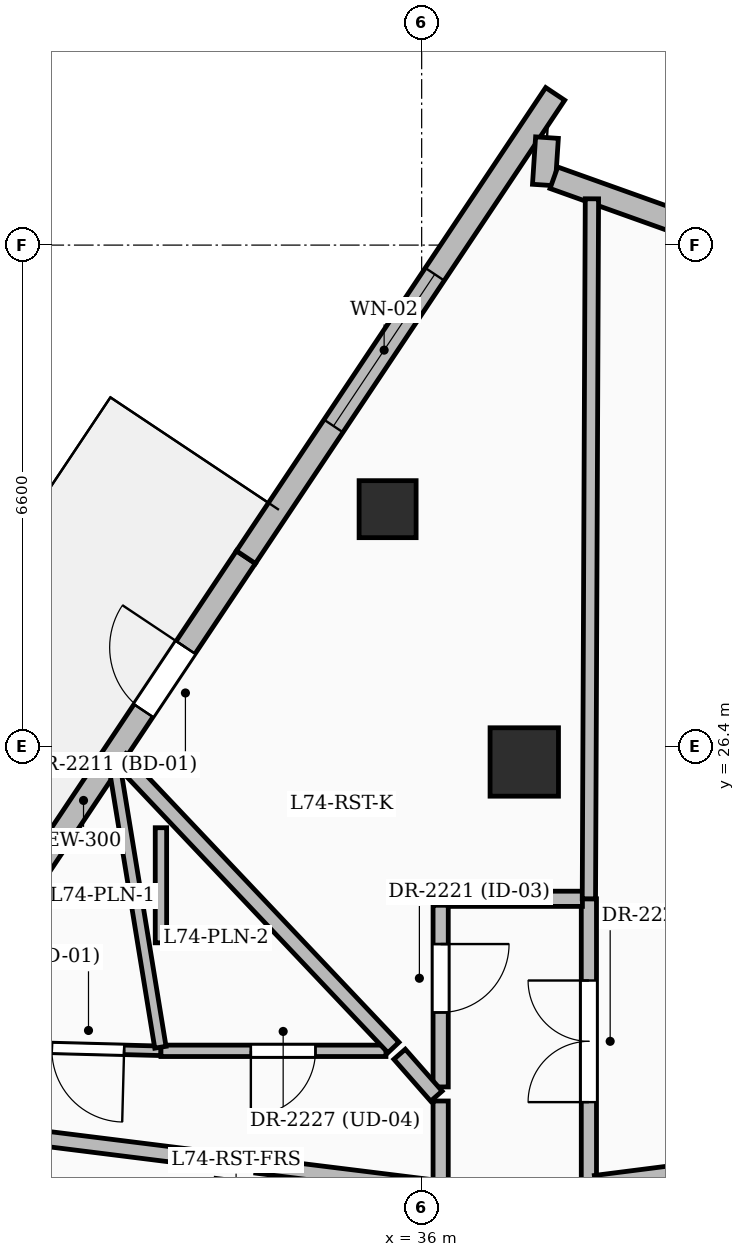
"""IFC4 building model, lengths in metres.
Left out: names, types, materials, properties, quantities, classifications, styles, units other than length and angle.
Written with IfcOpenShell. Run it as: python <this file> out.ifc"""

import sys

from ifc_helpers import new_model, si_unit, direction, frame, frame_2d, origin, origin_2d, place, context, subcontext, project, spatial, rectangle, extrude, element, fill, save


model = new_model("IFC4")
c1 = context("Model", 3, precision=1e-05, world=origin(), true_north=direction((0.0, 1.0)))
c2 = subcontext(c1, "Body", "Model", "MODEL_VIEW")
j1 = project(units=[si_unit("LENGTHUNIT", "METRE"), si_unit("PLANEANGLEUNIT", "RADIAN")], contexts=[c1])
p1 = place(None, origin())
s1 = spatial("IfcSite", under=j1, at=p1, CompositionType="ELEMENT")
p2 = place(p1, origin())
s2 = spatial("IfcBuilding", under=s1, at=p2, CompositionType="ELEMENT")
p3 = place(p2, frame((0.0, 0.0, 285.75)))
s3 = spatial("IfcBuildingStorey", under=s2, at=p3, CompositionType="ELEMENT", Elevation=285.75)
p4 = place(p3, frame((37.35, 26.2, 0.0), z_axis=(0.0, 0.0, 1.0), x_axis=(1.0, 0.0, 0.0)))
e1 = element("IfcColumn", 1, at=p4, inside=s3, PredefinedType="COLUMN", context=c2, shape_type="SweptSolid", body=[
    extrude(rectangle(XDim=0.9, YDim=0.9, at=origin_2d()), origin(), (0.0, 0.0, 1.0), 3.75),
])
p5 = place(p3, frame((35.552, 29.526, 0.0), z_axis=(0.0, 0.0, 1.0), x_axis=(1.0, 0.0, 0.0)))
e2 = element("IfcColumn", 2, at=p5, inside=s3, PredefinedType="COLUMN", context=c2, shape_type="SweptSolid", body=[
    extrude(rectangle(XDim=0.75, YDim=0.75, at=origin_2d()), origin(), (0.0, 0.0, 1.0), 3.75),
])
p6 = place(p3, frame((29.415, 22.493, 0.0), z_axis=(0.0, 0.0, 1.0), x_axis=(0.5552198311, 0.831703636612, 0.0)))
e3 = element("IfcWall", 3, at=p6, inside=s3, PredefinedType="SOLIDWALL", context=c2, shape_type="SweptSolid", body=[
    extrude(rectangle(XDim=7.696, YDim=0.3, at=frame_2d((3.848, 0.0))), origin(), (0.0, 0.0, 1.0), 3.45),
])
p7 = place(p6, frame((5.269, 0.0, 0.0)))
e4 = element("IfcOpeningElement", 4, at=p7, cuts=e3, PredefinedType="OPENING", context=c2, shape_type="SweptSolid", body=[
    extrude(rectangle(XDim=1.0, YDim=2.2, at=frame_2d((0.5, 1.1))), frame((0.0, 0.16, 0.0), z_axis=(0.0, -1.0, 0.0), x_axis=(1.0, 0.0, 0.0)), (0.0, 0.0, 1.0), 0.32),
])
p8 = place(p3, frame((33.688, 28.895, 0.0), z_axis=(0.0, 0.0, 1.0), x_axis=(0.555199825996, 0.831716991058, 0.0)))
e5 = element("IfcWall", 5, at=p8, inside=s3, PredefinedType="SOLIDWALL", context=c2, shape_type="SweptSolid", body=[
    extrude(rectangle(XDim=7.328, YDim=0.3, at=frame_2d((3.664, 0.0))), origin(), (0.0, 0.0, 1.0), 3.45),
])
p9 = place(p8, frame((2.075, 0.0, 0.6)))
e6 = element("IfcOpeningElement", 6, at=p9, cuts=e5, PredefinedType="OPENING", context=c2, shape_type="SweptSolid", body=[
    extrude(rectangle(XDim=2.4, YDim=2.1, at=frame_2d((1.2, 1.05))), frame((0.0, 0.16, 0.0), z_axis=(0.0, -1.0, 0.0), x_axis=(1.0, 0.0, 0.0)), (0.0, 0.0, 1.0), 0.32),
])
p10 = place(p3, frame((37.649, 34.414, 0.0), z_axis=(0.0, 0.0, 1.0), x_axis=(-0.065222861299, -0.99787072227, 0.0)))
e7 = element("IfcWall", 7, at=p10, inside=s3, PredefinedType="SOLIDWALL", context=c2, shape_type="SweptSolid", body=[
    extrude(rectangle(XDim=0.625, YDim=0.3, at=frame_2d((0.312, 0.0))), origin(), (0.0, 0.0, 1.0), 3.45),
])
p11 = place(p3, frame((37.74, 33.886, 0.0), z_axis=(0.0, 0.0, 1.0), x_axis=(0.941667785429, -0.336543878097, 0.0)))
e8 = element("IfcWall", 8, at=p11, inside=s3, PredefinedType="SOLIDWALL", context=c2, shape_type="SweptSolid", body=[
    extrude(rectangle(XDim=2.087, YDim=0.3, at=frame_2d((1.043, 0.0))), origin(), (0.0, 0.0, 1.0), 3.45),
])
p12 = place(p3, frame((36.25, 21.74, 0.0), z_axis=(0.0, 0.0, 1.0), x_axis=(0.0, -1.0, 0.0)))
e9 = element("IfcWall", 9, at=p12, inside=s3, PredefinedType="PARTITIONING", context=c2, shape_type="SweptSolid", body=[
    extrude(rectangle(XDim=1.15, YDim=0.2, at=frame_2d((0.575, 0.0))), origin(), (0.0, 0.0, 1.0), 3.45),
])
p13 = place(p3, frame((38.2, 20.65, 0.0), z_axis=(0.0, 0.0, 1.0), x_axis=(0.0, 1.0, 0.0)))
e10 = element("IfcWall", 10, at=p13, inside=s3, PredefinedType="PARTITIONING", context=c2, shape_type="SweptSolid", body=[
    extrude(rectangle(XDim=3.75, YDim=0.2, at=frame_2d((1.875, 0.0))), origin(), (0.0, 0.0, 1.0), 3.45),
])
p14 = place(p13, frame((1.075, 0.0, 0.0)))
e11 = element("IfcOpeningElement", 11, at=p14, cuts=e10, PredefinedType="OPENING", context=c2, shape_type="SweptSolid", body=[
    extrude(rectangle(XDim=1.6, YDim=2.3, at=frame_2d((0.8, 1.15))), frame((0.0, 0.11, 0.0), z_axis=(0.0, -1.0, 0.0), x_axis=(1.0, 0.0, 0.0)), (0.0, 0.0, 1.0), 0.22),
])
p15 = place(p3, frame((38.115, 24.4, 0.0), z_axis=(0.0, 0.0, 1.0), x_axis=(-1.0, 0.0, 0.0)))
e12 = element("IfcWall", 12, at=p15, inside=s3, PredefinedType="PARTITIONING", context=c2, shape_type="SweptSolid", body=[
    extrude(rectangle(XDim=1.865, YDim=0.2, at=frame_2d((0.933, 0.0))), origin(), (0.0, 0.0, 1.0), 2.635),
])
p16 = place(p3, frame((36.25, 24.315, 0.0), z_axis=(0.0, 0.0, 1.0), x_axis=(0.0, -1.0, 0.0)))
e13 = element("IfcWall", 13, at=p16, inside=s3, PredefinedType="PARTITIONING", context=c2, shape_type="SweptSolid", body=[
    extrude(rectangle(XDim=2.39, YDim=0.2, at=frame_2d((1.195, 0.0))), origin(), (0.0, 0.0, 1.0), 2.635),
])
p17 = place(p16, frame((0.51, 0.0, 0.0)))
e14 = element("IfcOpeningElement", 14, at=p17, cuts=e13, PredefinedType="OPENING", context=c2, shape_type="SweptSolid", body=[
    extrude(rectangle(XDim=0.9, YDim=2.1, at=frame_2d((0.45, 1.05))), frame((0.0, 0.11, 0.0), z_axis=(0.0, -1.0, 0.0), x_axis=(1.0, 0.0, 0.0)), (0.0, 0.0, 1.0), 0.22),
])
p18 = place(p3, frame((33.4, 20.95, 0.0), z_axis=(0.0, 0.0, 1.0), x_axis=(-0.992279994178, 0.124017793696, 0.0)))
e15 = element("IfcWall", 15, at=p18, inside=s3, PredefinedType="PARTITIONING", context=c2, shape_type="SweptSolid", body=[
    extrude(rectangle(XDim=3.547, YDim=0.2, at=frame_2d((1.774, 0.0))), origin(), (0.0, 0.0, 1.0), 2.641),
])
p19 = place(p3, frame((36.166, 20.601, 0.0), z_axis=(0.0, 0.0, 1.0), x_axis=(-0.992414530334, 0.122936568936, 0.0)))
e16 = element("IfcWall", 16, at=p19, inside=s3, PredefinedType="PARTITIONING", context=c2, shape_type="SweptSolid", body=[
    extrude(rectangle(XDim=2.353, YDim=0.2, at=frame_2d((1.177, 0.0))), origin(), (0.0, 0.0, 1.0), 2.635),
])
p20 = place(p3, frame((41.75, 21.102, 0.0), z_axis=(0.0, 0.0, 1.0), x_axis=(-0.991980560466, -0.126390536264, 0.0)))
e17 = element("IfcWall", 17, at=p20, inside=s3, PredefinedType="PARTITIONING", context=c2, shape_type="SweptSolid", body=[
    extrude(rectangle(XDim=3.494, YDim=0.2, at=frame_2d((1.747, 0.0))), origin(), (0.0, 0.0, 1.0), 3.45),
])
p21 = place(p3, frame((32.57, 22.4, 0.0), z_axis=(0.0, 0.0, 1.0), x_axis=(-0.999650958783, 0.02641894404, 0.0)))
e18 = element("IfcWall", 18, at=p21, inside=s3, PredefinedType="PARTITIONING", context=c2, shape_type="SweptSolid", body=[
    extrude(rectangle(XDim=3.031, YDim=0.125, at=frame_2d((1.516, 0.0))), origin(), (0.0, 0.0, 1.0), 3.45),
])
p22 = place(p21, frame((0.485, 0.0, 0.0)))
e19 = element("IfcOpeningElement", 19, at=p22, cuts=e18, PredefinedType="OPENING", context=c2, shape_type="SweptSolid", body=[
    extrude(rectangle(XDim=0.95, YDim=2.2, at=frame_2d((0.475, 1.1))), frame((0.0, 0.072, 0.0), z_axis=(0.0, -1.0, 0.0), x_axis=(1.0, 0.0, 0.0)), (0.0, 0.0, 1.0), 0.145),
])
p23 = place(p3, frame((35.53, 22.4, 0.0), z_axis=(0.0, 0.0, 1.0), x_axis=(-1.0, 0.0, 0.0)))
e20 = element("IfcWall", 20, at=p23, inside=s3, PredefinedType="PARTITIONING", context=c2, shape_type="SweptSolid", body=[
    extrude(rectangle(XDim=2.96, YDim=0.15, at=frame_2d((1.48, 0.0))), origin(), (0.0, 0.0, 1.0), 2.635),
])
p24 = place(p23, frame((0.927, 0.0, 0.0)))
e21 = element("IfcOpeningElement", 21, at=p24, cuts=e20, PredefinedType="OPENING", context=c2, shape_type="SweptSolid", body=[
    extrude(rectangle(XDim=0.85, YDim=2.1, at=frame_2d((0.425, 1.05))), frame((0.0, 0.085, 0.0), z_axis=(0.0, -1.0, 0.0), x_axis=(1.0, 0.0, 0.0)), (0.0, 0.0, 1.0), 0.17),
])
p25 = place(p3, frame((36.194, 21.804, 0.0), z_axis=(0.0, 0.0, 1.0), x_axis=(-0.659869913994, 0.751379861724, 0.0)))
e22 = element("IfcWall", 22, at=p25, inside=s3, PredefinedType="PARTITIONING", context=c2, shape_type="SweptSolid", body=[
    extrude(rectangle(XDim=0.734, YDim=0.2, at=frame_2d((0.367, 0.0))), origin(), (0.0, 0.0, 1.0), 3.45),
])
p26 = place(p3, frame((32.563, 22.447, 0.0), z_axis=(0.0, 0.0, 1.0), x_axis=(-0.161074254275, 0.986942290415, 0.0)))
e23 = element("IfcWall", 23, at=p26, inside=s3, PredefinedType="PARTITIONING", context=c2, shape_type="SweptSolid", body=[
    extrude(rectangle(XDim=3.704, YDim=0.15, at=frame_2d((1.852, 0.0))), origin(), (0.0, 0.0, 1.0), 2.641),
])
p27 = place(p3, frame((35.629, 22.444, 0.0), z_axis=(0.0, 0.0, 1.0), x_axis=(-0.687396257766, 0.726282579173, 0.0)))
e24 = element("IfcWall", 24, at=p27, inside=s3, PredefinedType="PARTITIONING", context=c2, shape_type="SweptSolid", body=[
    extrude(rectangle(XDim=5.23, YDim=0.2, at=frame_2d((2.615, 0.0))), origin(), (0.0, 0.0, 1.0), 2.635),
])
p28 = place(p3, frame((38.24, 33.609, 0.0), z_axis=(0.0, 0.0, 1.0), x_axis=(-0.004347784993, -0.999990548338, 0.0)))
e25 = element("IfcWall", 25, at=p28, inside=s3, PredefinedType="PARTITIONING", context=c2, shape_type="SweptSolid", body=[
    extrude(rectangle(XDim=9.209, YDim=0.175, at=frame_2d((4.604, 0.0))), origin(), (0.0, 0.0, 1.0), 2.47),
])
p29 = place(p3, frame((32.57, 25.335, 0.0), z_axis=(0.0, 0.0, 1.0), x_axis=(0.0, -1.0, 0.0)))
e26 = element("IfcWall", 26, at=p29, inside=s3, PredefinedType="PARTITIONING", context=c2, shape_type="SweptSolid", body=[
    extrude(rectangle(XDim=1.514, YDim=0.15, at=frame_2d((0.757, 0.0))), origin(), (0.0, 0.0, 1.0), 2.641),
])
p30 = place(p7, origin())
e27 = element("IfcDoor", 27, at=p30, inside=s3, OperationType="SINGLE_SWING_RIGHT", PredefinedType="DOOR", context=c2, shape_type="SweptSolid", body=[
    extrude(rectangle(XDim=1.0, YDim=2.2, at=frame_2d((0.5, 1.1))), frame((0.0, 0.025, 0.0), z_axis=(0.0, -1.0, 0.0), x_axis=(1.0, 0.0, 0.0)), (0.0, 0.0, 1.0), 0.05),
])
fill(e4, e27)
p31 = place(p9, origin())
e28 = element("IfcWindow", 28, at=p31, inside=s3, PartitioningType="SINGLE_PANEL", PredefinedType="WINDOW", context=c2, shape_type="SweptSolid", body=[
    extrude(rectangle(XDim=2.4, YDim=2.1, at=frame_2d((1.2, 1.05))), frame((0.0, 0.03, 0.0), z_axis=(0.0, -1.0, 0.0), x_axis=(1.0, 0.0, 0.0)), (0.0, 0.0, 1.0), 0.06),
])
fill(e6, e28)
p32 = place(p14, origin())
e29 = element("IfcDoor", 29, at=p32, inside=s3, OperationType="DOUBLE_DOOR_SINGLE_SWING", PredefinedType="DOOR", context=c2, shape_type="SweptSolid", body=[
    extrude(rectangle(XDim=1.6, YDim=2.3, at=frame_2d((0.8, 1.15))), frame((0.0, 0.025, 0.0), z_axis=(0.0, -1.0, 0.0), x_axis=(1.0, 0.0, 0.0)), (0.0, 0.0, 1.0), 0.05),
])
fill(e11, e29)
p33 = place(p17, origin())
e30 = element("IfcDoor", 30, at=p33, inside=s3, OperationType="SINGLE_SWING_LEFT", PredefinedType="DOOR", context=c2, shape_type="SweptSolid", body=[
    extrude(rectangle(XDim=0.9, YDim=2.1, at=frame_2d((0.45, 1.05))), frame((0.0, 0.025, 0.0), z_axis=(0.0, -1.0, 0.0), x_axis=(1.0, 0.0, 0.0)), (0.0, 0.0, 1.0), 0.05),
])
fill(e14, e30)
p34 = place(p22, origin())
e31 = element("IfcDoor", 31, at=p34, inside=s3, OperationType="SINGLE_SWING_LEFT", PredefinedType="DOOR", context=c2, shape_type="SweptSolid", body=[
    extrude(rectangle(XDim=0.95, YDim=2.2, at=frame_2d((0.475, 1.1))), frame((0.0, 0.025, 0.0), z_axis=(0.0, -1.0, 0.0), x_axis=(1.0, 0.0, 0.0)), (0.0, 0.0, 1.0), 0.05),
])
fill(e19, e31)
p35 = place(p24, origin())
e32 = element("IfcDoor", 32, at=p35, inside=s3, OperationType="SINGLE_SWING_RIGHT", PredefinedType="DOOR", context=c2, shape_type="SweptSolid", body=[
    extrude(rectangle(XDim=0.85, YDim=2.1, at=frame_2d((0.425, 1.05))), frame((0.0, 0.025, 0.0), z_axis=(0.0, -1.0, 0.0), x_axis=(1.0, 0.0, 0.0)), (0.0, 0.0, 1.0), 0.05),
])
fill(e21, e32)
save(model, sys.argv[1])
